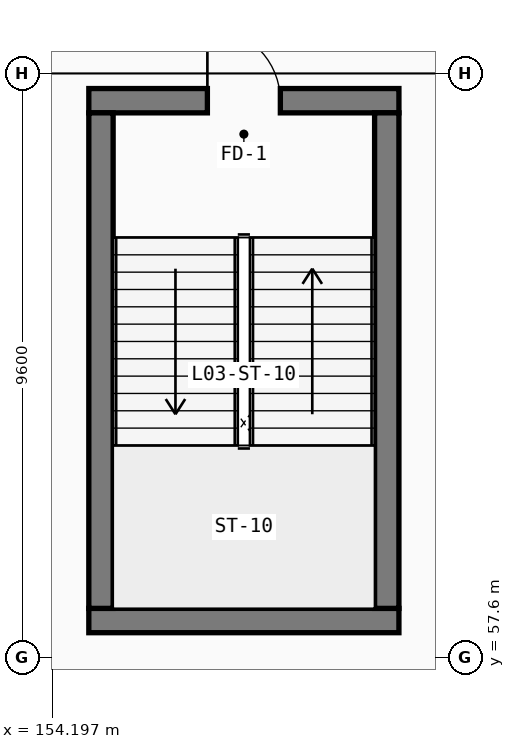
"""IFC4 building model, lengths in metres.
Left out: names, types, materials, properties, quantities, classifications, styles, units other than length and angle.
Written with IfcOpenShell. Run it as: python <this file> out.ifc"""

import sys

from ifc_helpers import new_model, si_unit, direction, frame, frame_2d, origin, place, context, subcontext, project, spatial, rectangle, extrude, element, fill, save


model = new_model("IFC4")
c1 = context("Model", 3, precision=1e-05, world=origin(), true_north=direction((0.0, 1.0)))
c2 = subcontext(c1, "Body", "Model", "MODEL_VIEW")
j1 = project(units=[si_unit("LENGTHUNIT", "METRE"), si_unit("PLANEANGLEUNIT", "RADIAN")], contexts=[c1])
p1 = place(None, origin())
s1 = spatial("IfcSite", under=j1, at=p1, CompositionType="ELEMENT")
p2 = place(p1, origin())
s2 = spatial("IfcBuilding", under=s1, at=p2, CompositionType="ELEMENT")
p3 = place(p2, frame((0.0, 0.0, 14.1)))
s3 = spatial("IfcBuildingStorey", under=s2, at=p3, CompositionType="ELEMENT", Elevation=14.1)
p4 = place(p3, frame((154.8, 58.2, 0.0), z_axis=(0.0, 0.0, 1.0), x_axis=(1.0, 0.0, 0.0)))
e1 = element("IfcWall", 1, at=p4, inside=s3, PredefinedType="SHEAR", context=c2, shape_type="SweptSolid", body=[
    extrude(rectangle(XDim=5.1, YDim=0.4, at=frame_2d((2.55, 0.0))), origin(), (0.0, 0.0, 1.0), 4.24),
])
p5 = place(p3, frame((159.9, 66.75, 0.0), z_axis=(0.0, 0.0, 1.0), x_axis=(-1.0, 0.0, 0.0)))
e2 = element("IfcWall", 2, at=p5, inside=s3, PredefinedType="SHEAR", context=c2, shape_type="SweptSolid", body=[
    extrude(rectangle(XDim=5.1, YDim=0.4, at=frame_2d((2.55, 0.0))), origin(), (0.0, 0.0, 1.0), 4.24),
])
p6 = place(p5, frame((3.15, 0.0, 0.0), z_axis=(0.0, 0.0, 1.0), x_axis=(-1.0, 0.0, 0.0)))
e3 = element("IfcOpeningElement", 3, at=p6, cuts=e2, PredefinedType="OPENING", context=c2, shape_type="SweptSolid", body=[
    extrude(rectangle(XDim=1.2, YDim=2.2, at=frame_2d((0.6, 1.1))), frame((0.0, 0.21, 0.0), z_axis=(0.0, -1.0, 0.0), x_axis=(1.0, 0.0, 0.0)), (0.0, 0.0, 1.0), 0.42),
])
for number, where, z_axis, x_axis in (
    (4, (155.0, 66.55, 0.0), (0.0, 0.0, 1.0), (0.0, -1.0, 0.0)),
    (5, (159.7, 58.4, 0.0), (0.0, 0.0, 1.0), (0.0, 1.0, 0.0)),
):
    element("IfcWall", number, at=place(p3, frame(where, z_axis=z_axis, x_axis=x_axis)), inside=s3, PredefinedType="SHEAR", context=c2, shape_type="SweptSolid", body=[
        extrude(rectangle(XDim=8.15, YDim=0.4, at=frame_2d((4.075, 0.0))), origin(), (0.0, 0.0, 1.0), 4.24),
    ])
p7 = place(p6, origin())
e6 = element("IfcDoor", 6, at=p7, inside=s3, OperationType="SINGLE_SWING_LEFT", PredefinedType="DOOR", context=c2, shape_type="SweptSolid", body=[
    extrude(rectangle(XDim=1.2, YDim=2.2, at=frame_2d((0.6, 1.1))), frame((0.0, 0.025, 0.0), z_axis=(0.0, -1.0, 0.0), x_axis=(1.0, 0.0, 0.0)), (0.0, 0.0, 1.0), 0.05),
])
fill(e3, e6)
save(model, sys.argv[1])
